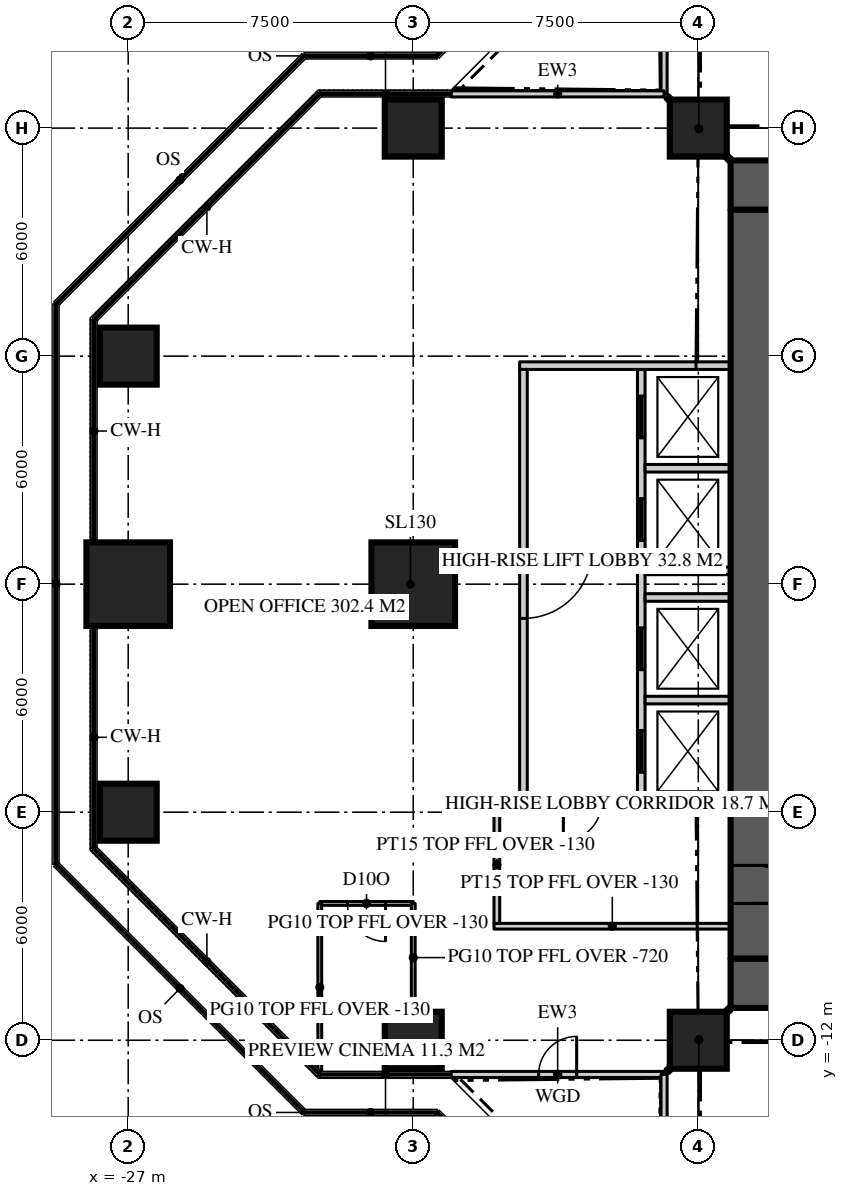
"""IFC4 building model, lengths in metres.
Left out: names, types, materials, properties, quantities, classifications, styles, units other than length and angle.
Written with IfcOpenShell. Run it as: python <this file> out.ifc"""

import sys

from ifc_helpers import new_model, si_unit, direction, frame, frame_2d, origin, origin_2d, place, context, subcontext, project, spatial, rectangle, extrude, element, fill, save


model = new_model("IFC4")
c1 = context("Model", 3, precision=1e-05, world=origin(), true_north=direction((0.0, 1.0)))
c2 = subcontext(c1, "Body", "Model", "MODEL_VIEW")
j1 = project(units=[si_unit("LENGTHUNIT", "METRE"), si_unit("PLANEANGLEUNIT", "RADIAN")], contexts=[c1])
p1 = place(None, origin())
s1 = spatial("IfcSite", under=j1, at=p1, CompositionType="ELEMENT")
p2 = place(p1, origin())
s2 = spatial("IfcBuilding", under=s1, at=p2, CompositionType="ELEMENT")
p3 = place(p2, frame((0.0, 0.0, 251.7)))
s3 = spatial("IfcBuildingStorey", under=s2, at=p3, CompositionType="ELEMENT", Elevation=251.7)
p4 = place(p3, frame((-11.15, 10.5, 0.0), z_axis=(0.0, 0.0, 1.0), x_axis=(1.0, 0.0, 0.0)))
e1 = element("IfcWall", 1, at=p4, inside=s3, PredefinedType="SHEAR", context=c2, shape_type="SweptSolid", body=[
    extrude(rectangle(XDim=22.3, YDim=1.3, at=frame_2d((11.15, 0.0))), origin(), (0.0, 0.0, 1.0), 3.9),
])
p5 = place(p4, frame((4.25, 0.0, 0.0)))
e2 = element("IfcOpeningElement", 2, at=p5, cuts=e1, PredefinedType="OPENING", context=c2, shape_type="SweptSolid", body=[
    extrude(rectangle(XDim=1.8, YDim=2.2, at=frame_2d((0.9, 1.1))), frame((0.0, 0.66, 0.0), z_axis=(0.0, -1.0, 0.0), x_axis=(1.0, 0.0, 0.0)), (0.0, 0.0, 1.0), 1.32),
])
p6 = place(p4, frame((16.25, 0.0, 0.0)))
e3 = element("IfcOpeningElement", 3, at=p6, cuts=e1, PredefinedType="OPENING", context=c2, shape_type="SweptSolid", body=[
    extrude(rectangle(XDim=1.8, YDim=2.2, at=frame_2d((0.9, 1.1))), frame((0.0, 0.66, 0.0), z_axis=(0.0, -1.0, 0.0), x_axis=(1.0, 0.0, 0.0)), (0.0, 0.0, 1.0), 1.32),
])
p7 = place(p3, frame((11.15, -10.5, 0.0), z_axis=(0.0, 0.0, 1.0), x_axis=(-1.0, 0.0, 0.0)))
e4 = element("IfcWall", 4, at=p7, inside=s3, PredefinedType="SHEAR", context=c2, shape_type="SweptSolid", body=[
    extrude(rectangle(XDim=22.3, YDim=1.3, at=frame_2d((11.15, 0.0))), origin(), (0.0, 0.0, 1.0), 3.9),
])
p8 = place(p7, frame((16.25, 0.0, 0.0)))
e5 = element("IfcOpeningElement", 5, at=p8, cuts=e4, PredefinedType="OPENING", context=c2, shape_type="SweptSolid", body=[
    extrude(rectangle(XDim=1.8, YDim=2.2, at=frame_2d((0.9, 1.1))), frame((0.0, 0.66, 0.0), z_axis=(0.0, -1.0, 0.0), x_axis=(1.0, 0.0, 0.0)), (0.0, 0.0, 1.0), 1.32),
])
p9 = place(p7, frame((4.25, 0.0, 0.0)))
e6 = element("IfcOpeningElement", 6, at=p9, cuts=e4, PredefinedType="OPENING", context=c2, shape_type="SweptSolid", body=[
    extrude(rectangle(XDim=1.8, YDim=2.2, at=frame_2d((0.9, 1.1))), frame((0.0, 0.66, 0.0), z_axis=(0.0, -1.0, 0.0), x_axis=(1.0, 0.0, 0.0)), (0.0, 0.0, 1.0), 1.32),
])
p10 = place(p3, frame((-10.5, 9.85, 0.0), z_axis=(0.0, 0.0, 1.0), x_axis=(0.0, -1.0, 0.0)))
e7 = element("IfcWall", 7, at=p10, inside=s3, PredefinedType="SHEAR", context=c2, shape_type="SweptSolid", body=[
    extrude(rectangle(XDim=19.7, YDim=1.3, at=frame_2d((9.85, 0.0))), origin(), (0.0, 0.0, 1.0), 3.9),
])
p11 = place(p10, frame((17.25, 0.0, 0.0)))
e8 = element("IfcOpeningElement", 8, at=p11, cuts=e7, PredefinedType="OPENING", context=c2, shape_type="SweptSolid", body=[
    extrude(rectangle(XDim=1.0, YDim=2.2, at=frame_2d((0.5, 1.1))), frame((0.0, 0.66, 0.0), z_axis=(0.0, -1.0, 0.0), x_axis=(1.0, 0.0, 0.0)), (0.0, 0.0, 1.0), 1.32),
])
for number, where, z_axis, x_axis in (
    (9, (-19.5, -12.0, 0.0), (0.0, 0.0, 1.0), (1.0, 0.0, 0.0)),
    (10, (-12.0, -12.0, 0.0), (0.0, 0.0, 1.0), (1.0, 0.0, 0.0)),
    (11, (-27.0, -6.0, 0.0), (0.0, 0.0, 1.0), (1.0, 0.0, 0.0)),
):
    element("IfcColumn", number, at=place(p3, frame(where, z_axis=z_axis, x_axis=x_axis)), inside=s3, PredefinedType="COLUMN", context=c2, shape_type="SweptSolid", body=[
        extrude(rectangle(XDim=1.5, YDim=1.5, at=origin_2d()), origin(), (0.0, 0.0, 1.0), 3.9),
    ])
for number, where, z_axis, x_axis in (
    (12, (-27.0, 0.0, 0.0), (0.0, 0.0, 1.0), (1.0, 0.0, 0.0)),
    (13, (-19.5, 0.0, 0.0), (0.0, 0.0, 1.0), (1.0, 0.0, 0.0)),
):
    element("IfcColumn", number, at=place(p3, frame(where, z_axis=z_axis, x_axis=x_axis)), inside=s3, PredefinedType="COLUMN", context=c2, shape_type="SweptSolid", body=[
        extrude(rectangle(XDim=2.2, YDim=2.2, at=origin_2d()), origin(), (0.0, 0.0, 1.0), 3.9),
    ])
for number, where, z_axis, x_axis in (
    (14, (-27.0, 6.0, 0.0), (0.0, 0.0, 1.0), (1.0, 0.0, 0.0)),
    (15, (-19.5, 12.0, 0.0), (0.0, 0.0, 1.0), (1.0, 0.0, 0.0)),
    (16, (-12.0, 12.0, 0.0), (0.0, 0.0, 1.0), (1.0, 0.0, 0.0)),
):
    element("IfcColumn", number, at=place(p3, frame(where, z_axis=z_axis, x_axis=x_axis)), inside=s3, PredefinedType="COLUMN", context=c2, shape_type="SweptSolid", body=[
        extrude(rectangle(XDim=1.5, YDim=1.5, at=origin_2d()), origin(), (0.0, 0.0, 1.0), 3.9),
    ])
p12 = place(p3, frame((-12.9, 18.5, 0.0), z_axis=(0.0, 0.0, 1.0), x_axis=(0.0, -1.0, 0.0)))
e17 = element("IfcWall", 17, at=p12, inside=s3, PredefinedType="SOLIDWALL", context=c2, shape_type="SweptSolid", body=[
    extrude(rectangle(XDim=5.6, YDim=0.16, at=frame_2d((2.8, 0.0))), origin(), (0.0, 0.0, 1.0), 3.77),
])
p13 = place(p12, frame((2.3, 0.0, 0.0)))
e18 = element("IfcOpeningElement", 18, at=p13, cuts=e17, PredefinedType="OPENING", context=c2, shape_type="SweptSolid", body=[
    extrude(rectangle(XDim=1.0, YDim=2.2, at=frame_2d((0.5, 1.1))), frame((0.0, 0.09, 0.0), z_axis=(0.0, -1.0, 0.0), x_axis=(1.0, 0.0, 0.0)), (0.0, 0.0, 1.0), 0.18),
])
p14 = place(p3, frame((-12.9, 12.9, 0.0), z_axis=(0.0, 0.0, 1.0), x_axis=(-1.0, 0.0, 0.0)))
e19 = element("IfcWall", 19, at=p14, inside=s3, PredefinedType="SOLIDWALL", context=c2, shape_type="SweptSolid", body=[
    extrude(rectangle(XDim=5.6, YDim=0.16, at=frame_2d((2.8, 0.0))), origin(), (0.0, 0.0, 1.0), 3.77),
])
p15 = place(p3, frame((-18.5, -12.9, 0.0), z_axis=(0.0, 0.0, 1.0), x_axis=(1.0, 0.0, 0.0)))
e20 = element("IfcWall", 20, at=p15, inside=s3, PredefinedType="SOLIDWALL", context=c2, shape_type="SweptSolid", body=[
    extrude(rectangle(XDim=5.6, YDim=0.16, at=frame_2d((2.8, 0.0))), origin(), (0.0, 0.0, 1.0), 3.77),
])
p16 = place(p15, frame((2.3, 0.0, 0.0)))
e21 = element("IfcOpeningElement", 21, at=p16, cuts=e20, PredefinedType="OPENING", context=c2, shape_type="SweptSolid", body=[
    extrude(rectangle(XDim=1.0, YDim=2.2, at=frame_2d((0.5, 1.1))), frame((0.0, 0.09, 0.0), z_axis=(0.0, -1.0, 0.0), x_axis=(1.0, 0.0, 0.0)), (0.0, 0.0, 1.0), 0.18),
])
p17 = place(p3, frame((-12.9, -12.9, 0.0), z_axis=(0.0, 0.0, 1.0), x_axis=(0.0, -1.0, 0.0)))
e22 = element("IfcWall", 22, at=p17, inside=s3, PredefinedType="SOLIDWALL", context=c2, shape_type="SweptSolid", body=[
    extrude(rectangle(XDim=5.6, YDim=0.16, at=frame_2d((2.8, 0.0))), origin(), (0.0, 0.0, 1.0), 3.77),
])
p18 = place(p3, frame((-19.5, -8.4, 0.0), z_axis=(0.0, 0.0, 1.0), x_axis=(-1.0, 0.0, 0.0)))
e23 = element("IfcWall", 23, at=p18, inside=s3, PredefinedType="PARTITIONING", context=c2, shape_type="SweptSolid", body=[
    extrude(rectangle(XDim=2.459, YDim=0.1, at=frame_2d((1.229, 0.0))), origin(), (0.0, 0.0, 1.0), 3.77),
])
p19 = place(p18, frame((0.729, 0.0, 0.0)))
e24 = element("IfcOpeningElement", 24, at=p19, cuts=e23, PredefinedType="OPENING", context=c2, shape_type="SweptSolid", body=[
    extrude(rectangle(XDim=1.0, YDim=2.2, at=frame_2d((0.5, 1.1))), frame((0.0, 0.06, 0.0), z_axis=(0.0, -1.0, 0.0), x_axis=(1.0, 0.0, 0.0)), (0.0, 0.0, 1.0), 0.12),
])
p20 = place(p3, frame((-19.5, -8.4, 0.0), z_axis=(0.0, 0.0, 1.0), x_axis=(0.0, -1.0, 0.0)))
e25 = element("IfcWall", 25, at=p20, inside=s3, PredefinedType="PARTITIONING", context=c2, shape_type="SweptSolid", body=[
    extrude(rectangle(XDim=2.85, YDim=0.1, at=frame_2d((1.425, 0.0))), origin(), (0.0, 0.0, 1.0), 3.18),
])
p21 = place(p3, frame((-21.959, -8.4, 0.0), z_axis=(0.0, 0.0, 1.0), x_axis=(0.0, -1.0, 0.0)))
e26 = element("IfcWall", 26, at=p21, inside=s3, PredefinedType="PARTITIONING", context=c2, shape_type="SweptSolid", body=[
    extrude(rectangle(XDim=4.42, YDim=0.1, at=frame_2d((2.21, 0.0))), origin(), (0.0, 0.0, 1.0), 3.77),
])
p22 = place(p3, frame((-13.5, 5.65, 0.0), z_axis=(0.0, 0.0, 1.0), x_axis=(0.0, -1.0, 0.0)))
e27 = element("IfcWall", 27, at=p22, inside=s3, PredefinedType="SOLIDWALL", context=c2, shape_type="SweptSolid", body=[
    extrude(rectangle(XDim=11.3, YDim=0.2, at=frame_2d((5.65, 0.0))), origin(), (0.0, 0.0, 1.0), 3.7),
])
p23 = place(p22, frame((0.7, 0.0, 0.0)))
e28 = element("IfcOpeningElement", 28, at=p23, cuts=e27, PredefinedType="OPENING", context=c2, shape_type="SweptSolid", body=[
    extrude(rectangle(XDim=1.1, YDim=2.2, at=frame_2d((0.55, 1.1))), frame((0.0, 0.11, 0.0), z_axis=(0.0, -1.0, 0.0), x_axis=(1.0, 0.0, 0.0)), (0.0, 0.0, 1.0), 0.22),
])
p24 = place(p22, frame((3.4, 0.0, 0.0)))
e29 = element("IfcOpeningElement", 29, at=p24, cuts=e27, PredefinedType="OPENING", context=c2, shape_type="SweptSolid", body=[
    extrude(rectangle(XDim=1.1, YDim=2.2, at=frame_2d((0.55, 1.1))), frame((0.0, 0.11, 0.0), z_axis=(0.0, -1.0, 0.0), x_axis=(1.0, 0.0, 0.0)), (0.0, 0.0, 1.0), 0.22),
])
p25 = place(p22, frame((6.8, 0.0, 0.0)))
e30 = element("IfcOpeningElement", 30, at=p25, cuts=e27, PredefinedType="OPENING", context=c2, shape_type="SweptSolid", body=[
    extrude(rectangle(XDim=1.1, YDim=2.2, at=frame_2d((0.55, 1.1))), frame((0.0, 0.11, 0.0), z_axis=(0.0, -1.0, 0.0), x_axis=(1.0, 0.0, 0.0)), (0.0, 0.0, 1.0), 0.22),
])
p26 = place(p22, frame((9.5, 0.0, 0.0)))
e31 = element("IfcOpeningElement", 31, at=p26, cuts=e27, PredefinedType="OPENING", context=c2, shape_type="SweptSolid", body=[
    extrude(rectangle(XDim=1.1, YDim=2.2, at=frame_2d((0.55, 1.1))), frame((0.0, 0.11, 0.0), z_axis=(0.0, -1.0, 0.0), x_axis=(1.0, 0.0, 0.0)), (0.0, 0.0, 1.0), 0.22),
])
p27 = place(p3, frame((-11.15, 5.75, 0.0), z_axis=(0.0, 0.0, 1.0), x_axis=(-1.0, 0.0, 0.0)))
e32 = element("IfcWall", 32, at=p27, inside=s3, PredefinedType="SOLIDWALL", context=c2, shape_type="SweptSolid", body=[
    extrude(rectangle(XDim=5.55, YDim=0.2, at=frame_2d((2.775, 0.0))), origin(), (0.0, 0.0, 1.0), 3.7),
])
p28 = place(p3, frame((-11.15, -5.75, 0.0), z_axis=(0.0, 0.0, 1.0), x_axis=(-1.0, 0.0, 0.0)))
e33 = element("IfcWall", 33, at=p28, inside=s3, PredefinedType="SOLIDWALL", context=c2, shape_type="SweptSolid", body=[
    extrude(rectangle(XDim=5.55, YDim=0.2, at=frame_2d((2.775, 0.0))), origin(), (0.0, 0.0, 1.0), 3.7),
])
p29 = place(p28, frame((3.4, 0.0, 0.0)))
e34 = element("IfcOpeningElement", 34, at=p29, cuts=e33, PredefinedType="OPENING", context=c2, shape_type="SweptSolid", body=[
    extrude(rectangle(XDim=1.0, YDim=2.2, at=frame_2d((0.5, 1.1))), frame((0.0, 0.11, 0.0), z_axis=(0.0, -1.0, 0.0), x_axis=(1.0, 0.0, 0.0)), (0.0, 0.0, 1.0), 0.22),
])
for number, where, z_axis, x_axis in (
    (35, (-11.15, 3.05, 0.0), (0.0, 0.0, 1.0), (-1.0, 0.0, 0.0)),
    (36, (-11.15, 0.35, 0.0), (0.0, 0.0, 1.0), (-1.0, 0.0, 0.0)),
    (37, (-11.15, -0.35, 0.0), (0.0, 0.0, 1.0), (-1.0, 0.0, 0.0)),
    (38, (-11.15, -3.05, 0.0), (0.0, 0.0, 1.0), (-1.0, 0.0, 0.0)),
):
    element("IfcWall", number, at=place(p3, frame(where, z_axis=z_axis, x_axis=x_axis)), inside=s3, PredefinedType="SOLIDWALL", context=c2, shape_type="SweptSolid", body=[
        extrude(rectangle(XDim=2.25, YDim=0.2, at=frame_2d((1.125, 0.0))), origin(), (0.0, 0.0, 1.0), 3.7),
    ])
p30 = place(p3, frame((-16.6, 5.65, 0.0), z_axis=(0.0, 0.0, 1.0), x_axis=(0.0, -1.0, 0.0)))
e39 = element("IfcWall", 39, at=p30, inside=s3, PredefinedType="SOLIDWALL", context=c2, shape_type="SweptSolid", body=[
    extrude(rectangle(XDim=11.3, YDim=0.2, at=frame_2d((5.65, 0.0))), origin(), (0.0, 0.0, 1.0), 3.18),
])
p31 = place(p30, frame((4.75, 0.0, 0.0)))
e40 = element("IfcOpeningElement", 40, at=p31, cuts=e39, PredefinedType="OPENING", context=c2, shape_type="SweptSolid", body=[
    extrude(rectangle(XDim=1.8, YDim=2.2, at=frame_2d((0.9, 1.1))), frame((0.0, 0.11, 0.0), z_axis=(0.0, -1.0, 0.0), x_axis=(1.0, 0.0, 0.0)), (0.0, 0.0, 1.0), 0.22),
])
for number, where, z_axis, x_axis in (
    (41, (-11.15, 11.15, 0.0), (0.0, 0.0, 1.0), (-0.707, 0.707, 0.0)),
    (42, (-11.15, -11.15, 0.0), (0.0, 0.0, 1.0), (-0.707, -0.707, 0.0)),
):
    element("IfcWall", number, at=place(p3, frame(where, z_axis=z_axis, x_axis=x_axis)), inside=s3, PredefinedType="PARTITIONING", context=c2, shape_type="SweptSolid", body=[
        extrude(rectangle(XDim=2.362, YDim=0.15, at=frame_2d((1.181, 0.0))), origin(), (0.0, 0.0, 1.0), 3.22),
    ])
p32 = place(p3, frame((-11.15, -9.0, 0.0), z_axis=(0.0, 0.0, 1.0), x_axis=(-1.0, 0.0, 0.0)))
e43 = element("IfcWall", 43, at=p32, inside=s3, PredefinedType="PARTITIONING", context=c2, shape_type="SweptSolid", body=[
    extrude(rectangle(XDim=6.225, YDim=0.15, at=frame_2d((3.113, 0.0))), origin(), (0.0, 0.0, 1.0), 3.77),
])
p33 = place(p3, frame((-17.3, -5.85, 0.0), z_axis=(0.0, 0.0, 1.0), x_axis=(0.0, -1.0, 0.0)))
e44 = element("IfcWall", 44, at=p33, inside=s3, PredefinedType="PARTITIONING", context=c2, shape_type="SweptSolid", body=[
    extrude(rectangle(XDim=3.075, YDim=0.15, at=frame_2d((1.538, 0.0))), origin(), (0.0, 0.0, 1.0), 3.77),
])
p34 = place(p16, origin())
e45 = element("IfcDoor", 45, at=p34, inside=s3, OperationType="SINGLE_SWING_RIGHT", PredefinedType="DOOR", context=c2, shape_type="SweptSolid", body=[
    extrude(rectangle(XDim=1.0, YDim=2.2, at=frame_2d((0.5, 1.1))), frame((0.0, 0.025, 0.0), z_axis=(0.0, -1.0, 0.0), x_axis=(1.0, 0.0, 0.0)), (0.0, 0.0, 1.0), 0.05),
])
fill(e21, e45)
p35 = place(p11, origin())
e46 = element("IfcDoor", 46, at=p35, inside=s3, OperationType="SINGLE_SWING_RIGHT", PredefinedType="DOOR", context=c2, shape_type="SweptSolid", body=[
    extrude(rectangle(XDim=1.0, YDim=2.2, at=frame_2d((0.5, 1.1))), frame((0.0, 0.025, 0.0), z_axis=(0.0, -1.0, 0.0), x_axis=(1.0, 0.0, 0.0)), (0.0, 0.0, 1.0), 0.05),
])
fill(e8, e46)
p36 = place(p19, origin())
e47 = element("IfcDoor", 47, at=p36, inside=s3, OperationType="SINGLE_SWING_LEFT", PredefinedType="DOOR", context=c2, shape_type="SweptSolid", body=[
    extrude(rectangle(XDim=1.0, YDim=2.2, at=frame_2d((0.5, 1.1))), frame((0.0, 0.025, 0.0), z_axis=(0.0, -1.0, 0.0), x_axis=(1.0, 0.0, 0.0)), (0.0, 0.0, 1.0), 0.05),
])
fill(e24, e47)
p37 = place(p31, origin())
e48 = element("IfcDoor", 48, at=p37, inside=s3, OperationType="DOUBLE_DOOR_DOUBLE_SWING", PredefinedType="DOOR", context=c2, shape_type="SweptSolid", body=[
    extrude(rectangle(XDim=1.8, YDim=2.2, at=frame_2d((0.9, 1.1))), frame((0.0, 0.025, 0.0), z_axis=(0.0, -1.0, 0.0), x_axis=(1.0, 0.0, 0.0)), (0.0, 0.0, 1.0), 0.05),
])
fill(e40, e48)
p38 = place(p23, origin())
e49 = element("IfcDoor", 49, at=p38, inside=s3, OperationType="SLIDING_TO_LEFT", PredefinedType="DOOR", context=c2, shape_type="SweptSolid", body=[
    extrude(rectangle(XDim=1.1, YDim=2.2, at=frame_2d((0.55, 1.1))), frame((0.0, 0.025, 0.0), z_axis=(0.0, -1.0, 0.0), x_axis=(1.0, 0.0, 0.0)), (0.0, 0.0, 1.0), 0.05),
])
fill(e28, e49)
p39 = place(p24, origin())
e50 = element("IfcDoor", 50, at=p39, inside=s3, OperationType="SLIDING_TO_LEFT", PredefinedType="DOOR", context=c2, shape_type="SweptSolid", body=[
    extrude(rectangle(XDim=1.1, YDim=2.2, at=frame_2d((0.55, 1.1))), frame((0.0, 0.025, 0.0), z_axis=(0.0, -1.0, 0.0), x_axis=(1.0, 0.0, 0.0)), (0.0, 0.0, 1.0), 0.05),
])
fill(e29, e50)
p40 = place(p25, origin())
e51 = element("IfcDoor", 51, at=p40, inside=s3, OperationType="SLIDING_TO_LEFT", PredefinedType="DOOR", context=c2, shape_type="SweptSolid", body=[
    extrude(rectangle(XDim=1.1, YDim=2.2, at=frame_2d((0.55, 1.1))), frame((0.0, 0.025, 0.0), z_axis=(0.0, -1.0, 0.0), x_axis=(1.0, 0.0, 0.0)), (0.0, 0.0, 1.0), 0.05),
])
fill(e30, e51)
p41 = place(p26, origin())
e52 = element("IfcDoor", 52, at=p41, inside=s3, OperationType="SLIDING_TO_LEFT", PredefinedType="DOOR", context=c2, shape_type="SweptSolid", body=[
    extrude(rectangle(XDim=1.1, YDim=2.2, at=frame_2d((0.55, 1.1))), frame((0.0, 0.025, 0.0), z_axis=(0.0, -1.0, 0.0), x_axis=(1.0, 0.0, 0.0)), (0.0, 0.0, 1.0), 0.05),
])
fill(e31, e52)
p42 = place(p29, origin())
e53 = element("IfcDoor", 53, at=p42, inside=s3, OperationType="SINGLE_SWING_RIGHT", PredefinedType="DOOR", context=c2, shape_type="SweptSolid", body=[
    extrude(rectangle(XDim=1.0, YDim=2.2, at=frame_2d((0.5, 1.1))), frame((0.0, 0.025, 0.0), z_axis=(0.0, -1.0, 0.0), x_axis=(1.0, 0.0, 0.0)), (0.0, 0.0, 1.0), 0.05),
])
fill(e34, e53)
save(model, sys.argv[1])
